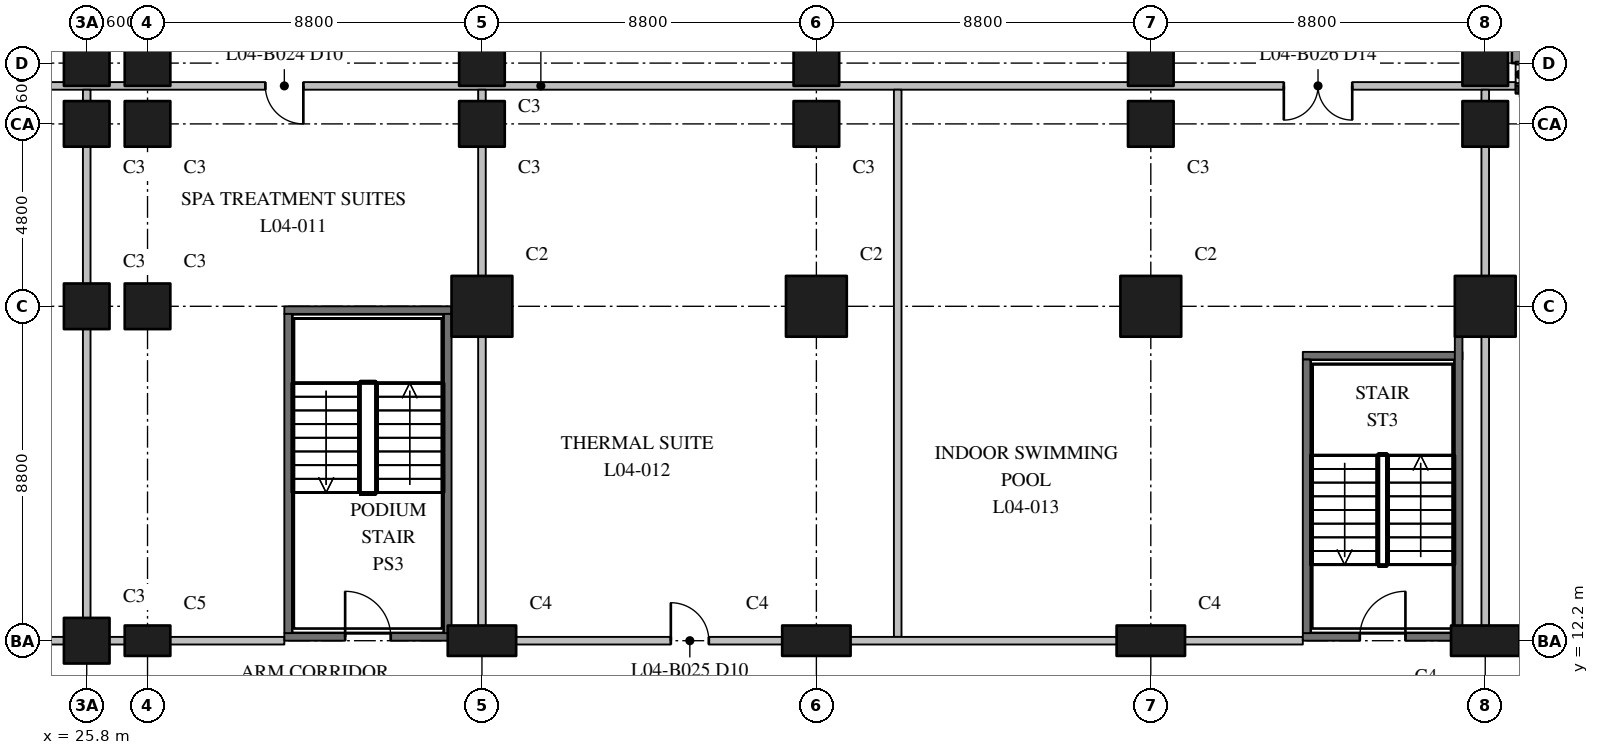
"""IFC4 building model, lengths in metres.
Left out: names, types, materials, properties, quantities, classifications, styles, units other than length and angle.
Written with IfcOpenShell. Run it as: python <this file> out.ifc"""

import sys

from ifc_helpers import new_model, si_unit, direction, frame, frame_2d, origin, origin_2d, place, context, subcontext, project, spatial, rectangle, extrude, element, fill, save


model = new_model("IFC4")
c1 = context("Model", 3, precision=1e-05, world=origin(), true_north=direction((0.0, 1.0)))
c2 = subcontext(c1, "Body", "Model", "MODEL_VIEW")
j1 = project(units=[si_unit("LENGTHUNIT", "METRE"), si_unit("PLANEANGLEUNIT", "RADIAN")], contexts=[c1])
p1 = place(None, origin())
s1 = spatial("IfcSite", under=j1, at=p1, CompositionType="ELEMENT")
p2 = place(p1, origin())
s2 = spatial("IfcBuilding", under=s1, at=p2, CompositionType="ELEMENT")
p3 = place(p2, frame((0.0, 0.0, 23.5)))
s3 = spatial("IfcBuildingStorey", under=s2, at=p3, CompositionType="ELEMENT", Elevation=23.5)
for number, where, z_axis, x_axis in (
    (1, (25.8, 12.2, 0.0), (0.0, 0.0, 1.0), (1.0, 0.0, 0.0)),
    (2, (25.8, 21.0, 0.0), (0.0, 0.0, 1.0), (1.0, 0.0, 0.0)),
    (3, (25.8, 25.8, 0.0), (0.0, 0.0, 1.0), (1.0, 0.0, 0.0)),
    (4, (25.8, 27.4, 0.0), (0.0, 0.0, 1.0), (1.0, 0.0, 0.0)),
):
    element("IfcColumn", number, at=place(p3, frame(where, z_axis=z_axis, x_axis=x_axis)), inside=s3, PredefinedType="COLUMN", context=c2, shape_type="SweptSolid", body=[
        extrude(rectangle(XDim=1.2, YDim=1.2, at=origin_2d()), origin(), (0.0, 0.0, 1.0), 5.5),
    ])
p4 = place(p3, frame((27.4, 12.2, 0.0), z_axis=(0.0, 0.0, 1.0), x_axis=(1.0, 0.0, 0.0)))
e5 = element("IfcColumn", 5, at=p4, inside=s3, PredefinedType="COLUMN", context=c2, shape_type="SweptSolid", body=[
    extrude(rectangle(XDim=1.2, YDim=0.8, at=origin_2d()), origin(), (0.0, 0.0, 1.0), 5.5),
])
for number, where, z_axis, x_axis in (
    (6, (27.4, 21.0, 0.0), (0.0, 0.0, 1.0), (1.0, 0.0, 0.0)),
    (7, (27.4, 25.8, 0.0), (0.0, 0.0, 1.0), (1.0, 0.0, 0.0)),
):
    element("IfcColumn", number, at=place(p3, frame(where, z_axis=z_axis, x_axis=x_axis)), inside=s3, PredefinedType="COLUMN", context=c2, shape_type="SweptSolid", body=[
        extrude(rectangle(XDim=1.2, YDim=1.2, at=origin_2d()), origin(), (0.0, 0.0, 1.0), 5.5),
    ])
p5 = place(p3, frame((36.2, 12.2, 0.0), z_axis=(0.0, 0.0, 1.0), x_axis=(1.0, 0.0, 0.0)))
e8 = element("IfcColumn", 8, at=p5, inside=s3, PredefinedType="COLUMN", context=c2, shape_type="SweptSolid", body=[
    extrude(rectangle(XDim=1.8, YDim=0.8, at=origin_2d()), origin(), (0.0, 0.0, 1.0), 5.5),
])
p6 = place(p3, frame((36.2, 21.0, 0.0), z_axis=(0.0, 0.0, 1.0), x_axis=(1.0, 0.0, 0.0)))
e9 = element("IfcColumn", 9, at=p6, inside=s3, PredefinedType="COLUMN", context=c2, shape_type="SweptSolid", body=[
    extrude(rectangle(XDim=1.6, YDim=1.6, at=origin_2d()), origin(), (0.0, 0.0, 1.0), 5.5),
])
p7 = place(p3, frame((36.2, 25.8, 0.0), z_axis=(0.0, 0.0, 1.0), x_axis=(1.0, 0.0, 0.0)))
e10 = element("IfcColumn", 10, at=p7, inside=s3, PredefinedType="COLUMN", context=c2, shape_type="SweptSolid", body=[
    extrude(rectangle(XDim=1.2, YDim=1.2, at=origin_2d()), origin(), (0.0, 0.0, 1.0), 5.5),
])
p8 = place(p3, frame((45.0, 12.2, 0.0), z_axis=(0.0, 0.0, 1.0), x_axis=(1.0, 0.0, 0.0)))
e11 = element("IfcColumn", 11, at=p8, inside=s3, PredefinedType="COLUMN", context=c2, shape_type="SweptSolid", body=[
    extrude(rectangle(XDim=1.8, YDim=0.8, at=origin_2d()), origin(), (0.0, 0.0, 1.0), 5.5),
])
p9 = place(p3, frame((45.0, 21.0, 0.0), z_axis=(0.0, 0.0, 1.0), x_axis=(1.0, 0.0, 0.0)))
e12 = element("IfcColumn", 12, at=p9, inside=s3, PredefinedType="COLUMN", context=c2, shape_type="SweptSolid", body=[
    extrude(rectangle(XDim=1.6, YDim=1.6, at=origin_2d()), origin(), (0.0, 0.0, 1.0), 5.5),
])
p10 = place(p3, frame((45.0, 25.8, 0.0), z_axis=(0.0, 0.0, 1.0), x_axis=(1.0, 0.0, 0.0)))
e13 = element("IfcColumn", 13, at=p10, inside=s3, PredefinedType="COLUMN", context=c2, shape_type="SweptSolid", body=[
    extrude(rectangle(XDim=1.2, YDim=1.2, at=origin_2d()), origin(), (0.0, 0.0, 1.0), 5.5),
])
p11 = place(p3, frame((53.8, 12.2, 0.0), z_axis=(0.0, 0.0, 1.0), x_axis=(1.0, 0.0, 0.0)))
e14 = element("IfcColumn", 14, at=p11, inside=s3, PredefinedType="COLUMN", context=c2, shape_type="SweptSolid", body=[
    extrude(rectangle(XDim=1.8, YDim=0.8, at=origin_2d()), origin(), (0.0, 0.0, 1.0), 5.5),
])
p12 = place(p3, frame((53.8, 21.0, 0.0), z_axis=(0.0, 0.0, 1.0), x_axis=(1.0, 0.0, 0.0)))
e15 = element("IfcColumn", 15, at=p12, inside=s3, PredefinedType="COLUMN", context=c2, shape_type="SweptSolid", body=[
    extrude(rectangle(XDim=1.6, YDim=1.6, at=origin_2d()), origin(), (0.0, 0.0, 1.0), 5.5),
])
p13 = place(p3, frame((53.8, 25.8, 0.0), z_axis=(0.0, 0.0, 1.0), x_axis=(1.0, 0.0, 0.0)))
e16 = element("IfcColumn", 16, at=p13, inside=s3, PredefinedType="COLUMN", context=c2, shape_type="SweptSolid", body=[
    extrude(rectangle(XDim=1.2, YDim=1.2, at=origin_2d()), origin(), (0.0, 0.0, 1.0), 5.5),
])
p14 = place(p3, frame((62.6, 12.2, 0.0), z_axis=(0.0, 0.0, 1.0), x_axis=(1.0, 0.0, 0.0)))
e17 = element("IfcColumn", 17, at=p14, inside=s3, PredefinedType="COLUMN", context=c2, shape_type="SweptSolid", body=[
    extrude(rectangle(XDim=1.8, YDim=0.8, at=origin_2d()), origin(), (0.0, 0.0, 1.0), 5.5),
])
p15 = place(p3, frame((62.6, 21.0, 0.0), z_axis=(0.0, 0.0, 1.0), x_axis=(1.0, 0.0, 0.0)))
e18 = element("IfcColumn", 18, at=p15, inside=s3, PredefinedType="COLUMN", context=c2, shape_type="SweptSolid", body=[
    extrude(rectangle(XDim=1.6, YDim=1.6, at=origin_2d()), origin(), (0.0, 0.0, 1.0), 5.5),
])
for number, where, z_axis, x_axis in (
    (19, (62.6, 25.8, 0.0), (0.0, 0.0, 1.0), (1.0, 0.0, 0.0)),
    (20, (27.4, 27.4, 0.0), (0.0, 0.0, 1.0), (1.0, 0.0, 0.0)),
    (21, (36.2, 27.4, 0.0), (0.0, 0.0, 1.0), (1.0, 0.0, 0.0)),
    (22, (45.0, 27.4, 0.0), (0.0, 0.0, 1.0), (1.0, 0.0, 0.0)),
    (23, (53.8, 27.4, 0.0), (0.0, 0.0, 1.0), (1.0, 0.0, 0.0)),
    (24, (62.6, 27.4, 0.0), (0.0, 0.0, 1.0), (1.0, 0.0, 0.0)),
):
    element("IfcColumn", number, at=place(p3, frame(where, z_axis=z_axis, x_axis=x_axis)), inside=s3, PredefinedType="COLUMN", context=c2, shape_type="SweptSolid", body=[
        extrude(rectangle(XDim=1.2, YDim=1.2, at=origin_2d()), origin(), (0.0, 0.0, 1.0), 5.5),
    ])
p16 = place(p3, frame((63.45, 27.4, 0.0), z_axis=(0.0, 0.0, 1.0), x_axis=(0.0, 1.0, 0.0)))
e25 = element("IfcWall", 25, at=p16, inside=s3, PredefinedType="STANDARD", context=c2, shape_type="SweptSolid", body=[
    extrude(rectangle(XDim=26.4, YDim=0.3, at=frame_2d((13.2, 0.0))), origin(), (0.0, 0.0, 1.0), 5.1),
])
p17 = place(p3, frame((57.8, 12.3, 0.0), z_axis=(0.0, 0.0, 1.0), x_axis=(1.0, 0.0, 0.0)))
e26 = element("IfcWall", 26, at=p17, inside=s3, PredefinedType="SHEAR", context=c2, shape_type="SweptSolid", body=[
    extrude(rectangle(XDim=4.2, YDim=0.2, at=frame_2d((2.1, 0.0))), origin(), (0.0, 0.0, 1.0), 5.1),
])
p18 = place(p17, frame((1.5, 0.0, 0.0)))
e27 = element("IfcOpeningElement", 27, at=p18, cuts=e26, PredefinedType="OPENING", context=c2, shape_type="SweptSolid", body=[
    extrude(rectangle(XDim=1.2, YDim=2.1, at=frame_2d((0.6, 1.05))), frame((0.0, 0.11, 0.0), z_axis=(0.0, -1.0, 0.0), x_axis=(1.0, 0.0, 0.0)), (0.0, 0.0, 1.0), 0.22),
])
p19 = place(p3, frame((57.8, 19.7, 0.0), z_axis=(0.0, 0.0, 1.0), x_axis=(1.0, 0.0, 0.0)))
e28 = element("IfcWall", 28, at=p19, inside=s3, PredefinedType="SHEAR", context=c2, shape_type="SweptSolid", body=[
    extrude(rectangle(XDim=4.2, YDim=0.2, at=frame_2d((2.1, 0.0))), origin(), (0.0, 0.0, 1.0), 5.1),
])
p20 = place(p3, frame((57.9, 12.4, 0.0), z_axis=(0.0, 0.0, 1.0), x_axis=(0.0, 1.0, 0.0)))
e29 = element("IfcWall", 29, at=p20, inside=s3, PredefinedType="SHEAR", context=c2, shape_type="SweptSolid", body=[
    extrude(rectangle(XDim=7.2, YDim=0.2, at=frame_2d((3.6, 0.0))), origin(), (0.0, 0.0, 1.0), 5.1),
])
p21 = place(p3, frame((61.9, 12.4, 0.0), z_axis=(0.0, 0.0, 1.0), x_axis=(0.0, 1.0, 0.0)))
e30 = element("IfcWall", 30, at=p21, inside=s3, PredefinedType="SHEAR", context=c2, shape_type="SweptSolid", body=[
    extrude(rectangle(XDim=7.8, YDim=0.2, at=frame_2d((3.9, 0.0))), origin(), (0.0, 0.0, 1.0), 5.1),
])
p22 = place(p3, frame((31.0, 12.3, 0.0), z_axis=(0.0, 0.0, 1.0), x_axis=(1.0, 0.0, 0.0)))
e31 = element("IfcWall", 31, at=p22, inside=s3, PredefinedType="SHEAR", context=c2, shape_type="SweptSolid", body=[
    extrude(rectangle(XDim=4.4, YDim=0.2, at=frame_2d((2.2, 0.0))), origin(), (0.0, 0.0, 1.0), 5.1),
])
p23 = place(p22, frame((1.6, 0.0, 0.0)))
e32 = element("IfcOpeningElement", 32, at=p23, cuts=e31, PredefinedType="OPENING", context=c2, shape_type="SweptSolid", body=[
    extrude(rectangle(XDim=1.2, YDim=2.1, at=frame_2d((0.6, 1.05))), frame((0.0, 0.11, 0.0), z_axis=(0.0, -1.0, 0.0), x_axis=(1.0, 0.0, 0.0)), (0.0, 0.0, 1.0), 0.22),
])
p24 = place(p3, frame((31.0, 20.9, 0.0), z_axis=(0.0, 0.0, 1.0), x_axis=(1.0, 0.0, 0.0)))
e33 = element("IfcWall", 33, at=p24, inside=s3, PredefinedType="SHEAR", context=c2, shape_type="SweptSolid", body=[
    extrude(rectangle(XDim=4.4, YDim=0.2, at=frame_2d((2.2, 0.0))), origin(), (0.0, 0.0, 1.0), 5.1),
])
for number, where, z_axis, x_axis in (
    (34, (31.1, 12.4, 0.0), (0.0, 0.0, 1.0), (0.0, 1.0, 0.0)),
    (35, (35.3, 12.4, 0.0), (0.0, 0.0, 1.0), (0.0, 1.0, 0.0)),
):
    element("IfcWall", number, at=place(p3, frame(where, z_axis=z_axis, x_axis=x_axis)), inside=s3, PredefinedType="SHEAR", context=c2, shape_type="SweptSolid", body=[
        extrude(rectangle(XDim=8.4, YDim=0.2, at=frame_2d((4.2, 0.0))), origin(), (0.0, 0.0, 1.0), 5.1),
    ])
p25 = place(p3, frame((12.1, 12.2, 0.0), z_axis=(0.0, 0.0, 1.0), x_axis=(1.0, 0.0, 0.0)))
e36 = element("IfcWall", 36, at=p25, inside=s3, PredefinedType="PARTITIONING", context=c2, shape_type="SweptSolid", body=[
    extrude(rectangle(XDim=18.9, YDim=0.2, at=frame_2d((9.45, 0.0))), origin(), (0.0, 0.0, 1.0), 5.1),
])
p26 = place(p25, frame((2.155, 0.0, 0.0)))
e37 = element("IfcOpeningElement", 37, at=p26, cuts=e36, PredefinedType="OPENING", context=c2, shape_type="SweptSolid", body=[
    extrude(rectangle(XDim=1.8, YDim=2.4, at=frame_2d((0.9, 1.2))), frame((0.0, 0.11, 0.0), z_axis=(0.0, -1.0, 0.0), x_axis=(1.0, 0.0, 0.0)), (0.0, 0.0, 1.0), 0.22),
])
p27 = place(p25, frame((9.855, 0.0, 0.0)))
e38 = element("IfcOpeningElement", 38, at=p27, cuts=e36, PredefinedType="OPENING", context=c2, shape_type="SweptSolid", body=[
    extrude(rectangle(XDim=1.0, YDim=2.1, at=frame_2d((0.5, 1.05))), frame((0.0, 0.11, 0.0), z_axis=(0.0, -1.0, 0.0), x_axis=(1.0, 0.0, 0.0)), (0.0, 0.0, 1.0), 0.22),
])
p28 = place(p3, frame((35.4, 12.2, 0.0), z_axis=(0.0, 0.0, 1.0), x_axis=(1.0, 0.0, 0.0)))
e39 = element("IfcWall", 39, at=p28, inside=s3, PredefinedType="PARTITIONING", context=c2, shape_type="SweptSolid", body=[
    extrude(rectangle(XDim=22.4, YDim=0.2, at=frame_2d((11.2, 0.0))), origin(), (0.0, 0.0, 1.0), 5.1),
])
p29 = place(p28, frame((5.77, 0.0, 0.0)))
e40 = element("IfcOpeningElement", 40, at=p29, cuts=e39, PredefinedType="OPENING", context=c2, shape_type="SweptSolid", body=[
    extrude(rectangle(XDim=1.0, YDim=2.1, at=frame_2d((0.5, 1.05))), frame((0.0, 0.11, 0.0), z_axis=(0.0, -1.0, 0.0), x_axis=(1.0, 0.0, 0.0)), (0.0, 0.0, 1.0), 0.22),
])
p30 = place(p3, frame((62.0, 12.2, 0.0), z_axis=(0.0, 0.0, 1.0), x_axis=(1.0, 0.0, 0.0)))
e41 = element("IfcWall", 41, at=p30, inside=s3, PredefinedType="PARTITIONING", context=c2, shape_type="SweptSolid", body=[
    extrude(rectangle(XDim=4.6, YDim=0.2, at=frame_2d((2.3, 0.0))), origin(), (0.0, 0.0, 1.0), 5.1),
])
p31 = place(p30, frame((2.1, 0.0, 0.0)))
e42 = element("IfcOpeningElement", 42, at=p31, cuts=e41, PredefinedType="OPENING", context=c2, shape_type="SweptSolid", body=[
    extrude(rectangle(XDim=1.0, YDim=2.1, at=frame_2d((0.5, 1.05))), frame((0.0, 0.11, 0.0), z_axis=(0.0, -1.0, 0.0), x_axis=(1.0, 0.0, 0.0)), (0.0, 0.0, 1.0), 0.22),
])
p32 = place(p3, frame((12.1, 26.8, 0.0), z_axis=(0.0, 0.0, 1.0), x_axis=(1.0, 0.0, 0.0)))
e43 = element("IfcWall", 43, at=p32, inside=s3, PredefinedType="PARTITIONING", context=c2, shape_type="SweptSolid", body=[
    extrude(rectangle(XDim=51.3, YDim=0.2, at=frame_2d((25.65, 0.0))), origin(), (0.0, 0.0, 1.0), 5.1),
])
p33 = place(p32, frame((18.4, 0.0, 0.0)))
e44 = element("IfcOpeningElement", 44, at=p33, cuts=e43, PredefinedType="OPENING", context=c2, shape_type="SweptSolid", body=[
    extrude(rectangle(XDim=1.0, YDim=2.1, at=frame_2d((0.5, 1.05))), frame((0.0, 0.11, 0.0), z_axis=(0.0, -1.0, 0.0), x_axis=(1.0, 0.0, 0.0)), (0.0, 0.0, 1.0), 0.22),
])
p34 = place(p32, frame((45.2, 0.0, 0.0)))
e45 = element("IfcOpeningElement", 45, at=p34, cuts=e43, PredefinedType="OPENING", context=c2, shape_type="SweptSolid", body=[
    extrude(rectangle(XDim=1.8, YDim=2.4, at=frame_2d((0.9, 1.2))), frame((0.0, 0.11, 0.0), z_axis=(0.0, -1.0, 0.0), x_axis=(1.0, 0.0, 0.0)), (0.0, 0.0, 1.0), 0.22),
])
for number, where, z_axis, x_axis in (
    (46, (36.2, 12.3, 0.0), (0.0, 0.0, 1.0), (0.0, 1.0, 0.0)),
    (47, (25.8, 12.3, 0.0), (0.0, 0.0, 1.0), (0.0, 1.0, 0.0)),
    (48, (47.14, 12.3, 0.0), (0.0, 0.0, 1.0), (0.0, 1.0, 0.0)),
    (49, (62.6, 12.3, 0.0), (0.0, 0.0, 1.0), (0.0, 1.0, 0.0)),
):
    element("IfcWall", number, at=place(p3, frame(where, z_axis=z_axis, x_axis=x_axis)), inside=s3, PredefinedType="PARTITIONING", context=c2, shape_type="SweptSolid", body=[
        extrude(rectangle(XDim=14.4, YDim=0.2, at=frame_2d((7.2, 0.0))), origin(), (0.0, 0.0, 1.0), 5.1),
    ])
p35 = place(p18, origin())
e50 = element("IfcDoor", 50, at=p35, inside=s3, OperationType="SINGLE_SWING_RIGHT", PredefinedType="DOOR", context=c2, shape_type="SweptSolid", body=[
    extrude(rectangle(XDim=1.2, YDim=2.1, at=frame_2d((0.6, 1.05))), frame((0.0, 0.025, 0.0), z_axis=(0.0, -1.0, 0.0), x_axis=(1.0, 0.0, 0.0)), (0.0, 0.0, 1.0), 0.05),
])
fill(e27, e50)
p36 = place(p23, origin())
e51 = element("IfcDoor", 51, at=p36, inside=s3, OperationType="SINGLE_SWING_LEFT", PredefinedType="DOOR", context=c2, shape_type="SweptSolid", body=[
    extrude(rectangle(XDim=1.2, YDim=2.1, at=frame_2d((0.6, 1.05))), frame((0.0, 0.025, 0.0), z_axis=(0.0, -1.0, 0.0), x_axis=(1.0, 0.0, 0.0)), (0.0, 0.0, 1.0), 0.05),
])
fill(e32, e51)
p37 = place(p33, frame((1.0, 0.0, 0.0), z_axis=(0.0, 0.0, 1.0), x_axis=(-1.0, 0.0, 0.0)))
e52 = element("IfcDoor", 52, at=p37, inside=s3, OperationType="SINGLE_SWING_RIGHT", PredefinedType="DOOR", context=c2, shape_type="SweptSolid", body=[
    extrude(rectangle(XDim=1.0, YDim=2.1, at=frame_2d((0.5, 1.05))), frame((0.0, 0.025, 0.0), z_axis=(0.0, -1.0, 0.0), x_axis=(1.0, 0.0, 0.0)), (0.0, 0.0, 1.0), 0.05),
])
fill(e44, e52)
p38 = place(p29, origin())
e53 = element("IfcDoor", 53, at=p38, inside=s3, OperationType="SINGLE_SWING_LEFT", PredefinedType="DOOR", context=c2, shape_type="SweptSolid", body=[
    extrude(rectangle(XDim=1.0, YDim=2.1, at=frame_2d((0.5, 1.05))), frame((0.0, 0.025, 0.0), z_axis=(0.0, -1.0, 0.0), x_axis=(1.0, 0.0, 0.0)), (0.0, 0.0, 1.0), 0.05),
])
fill(e40, e53)
p39 = place(p34, frame((1.8, 0.0, 0.0), z_axis=(0.0, 0.0, 1.0), x_axis=(-1.0, 0.0, 0.0)))
e54 = element("IfcDoor", 54, at=p39, inside=s3, OperationType="DOUBLE_DOOR_SINGLE_SWING", PredefinedType="DOOR", context=c2, shape_type="SweptSolid", body=[
    extrude(rectangle(XDim=1.8, YDim=2.4, at=frame_2d((0.9, 1.2))), frame((0.0, 0.025, 0.0), z_axis=(0.0, -1.0, 0.0), x_axis=(1.0, 0.0, 0.0)), (0.0, 0.0, 1.0), 0.05),
])
fill(e45, e54)
save(model, sys.argv[1])
